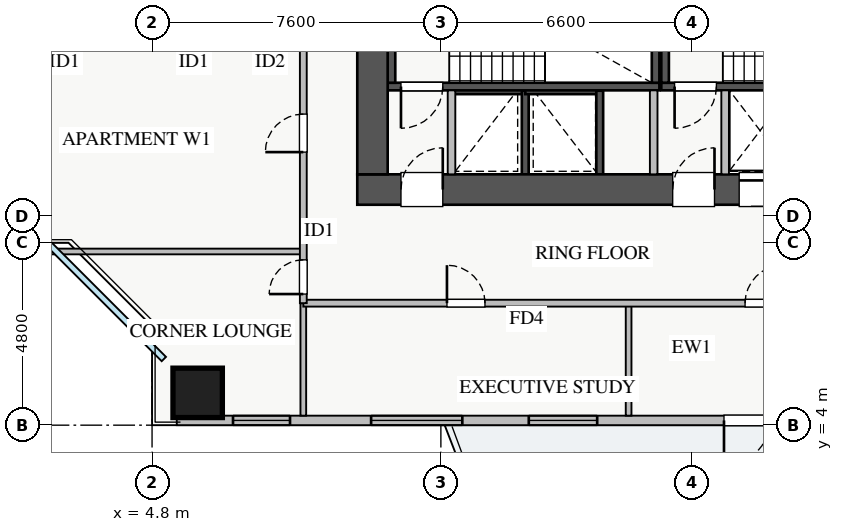
"""IFC4 building model, lengths in metres.
Left out: names, types, materials, properties, quantities, classifications, styles, units other than length and angle.
Written with IfcOpenShell. Run it as: python <this file> out.ifc"""

import sys

from ifc_helpers import new_model, si_unit, direction, frame, frame_2d, origin, origin_2d, place, context, subcontext, project, spatial, rectangle, extrude, source, transform, mapped, element, fill, save


model = new_model("IFC4")
c1 = context("Model", 3, precision=1e-05, world=origin(), true_north=direction((0.0, 1.0)))
c2 = subcontext(c1, "Body", "Model", "MODEL_VIEW")
j1 = project(units=[si_unit("LENGTHUNIT", "METRE"), si_unit("PLANEANGLEUNIT", "RADIAN")], contexts=[c1])
p1 = place(None, origin())
s1 = spatial("IfcSite", under=j1, at=p1, CompositionType="ELEMENT")
p2 = place(p1, origin())
s2 = spatial("IfcBuilding", under=s1, at=p2, CompositionType="ELEMENT")
p3 = place(p2, frame((0.0, 0.0, 26.25)))
s3 = spatial("IfcBuildingStorey", under=s2, at=p3, CompositionType="ELEMENT", Elevation=26.25)
p4 = place(p3, frame((12.68, 12.8, 0.0), z_axis=(0.0, 0.0, 1.0), x_axis=(1.0, 0.0, 0.0)))
e1 = element("IfcWall", 1, at=p4, inside=s3, PredefinedType="SHEAR", context=c2, shape_type="SweptSolid", body=[
    extrude(rectangle(XDim=1.94, YDim=0.18, at=frame_2d((0.97, 0.0))), origin(), (0.0, 0.0, 1.0), 3.07),
])
p5 = place(p3, frame((14.62, 10.6, 0.0), z_axis=(0.0, 0.0, 1.0), x_axis=(0.0, 1.0, 0.0)))
e2 = element("IfcWall", 2, at=p5, inside=s3, PredefinedType="SHEAR", context=c2, shape_type="SweptSolid", body=[
    extrude(rectangle(XDim=2.2, YDim=0.18, at=frame_2d((1.1, 0.0))), origin(), (0.0, 0.0, 1.0), 3.07),
])
p6 = place(p3, frame((14.62, 12.8, 0.0), z_axis=(0.0, 0.0, 1.0), x_axis=(1.0, 0.0, 0.0)))
e3 = element("IfcWall", 3, at=p6, inside=s3, PredefinedType="SHEAR", context=c2, shape_type="SweptSolid", body=[
    extrude(rectangle(XDim=1.96, YDim=0.18, at=frame_2d((0.98, 0.0))), origin(), (0.0, 0.0, 1.0), 3.07),
])
p7 = place(p3, frame((16.58, 10.6, 0.0), z_axis=(0.0, 0.0, 1.0), x_axis=(0.0, 1.0, 0.0)))
e4 = element("IfcWall", 4, at=p7, inside=s3, PredefinedType="SHEAR", context=c2, shape_type="SweptSolid", body=[
    extrude(rectangle(XDim=2.2, YDim=0.18, at=frame_2d((1.1, 0.0))), origin(), (0.0, 0.0, 1.0), 3.07),
])
p8 = place(p3, frame((19.88, 12.8, 0.0), z_axis=(0.0, 0.0, 1.0), x_axis=(1.0, 0.0, 0.0)))
e5 = element("IfcWall", 5, at=p8, inside=s3, PredefinedType="SHEAR", context=c2, shape_type="SweptSolid", body=[
    extrude(rectangle(XDim=1.87, YDim=0.18, at=frame_2d((0.935, 0.0))), origin(), (0.0, 0.0, 1.0), 3.07),
])
p9 = place(p3, frame((11.0, 12.91, 0.0), z_axis=(0.0, 0.0, 1.0), x_axis=(1.0, 0.0, 0.0)))
e6 = element("IfcWall", 6, at=p9, inside=s3, PredefinedType="SHEAR", context=c2, shape_type="SweptSolid", body=[
    extrude(rectangle(XDim=7.15, YDim=0.2, at=frame_2d((3.575, 0.0))), origin(), (0.0, 0.0, 1.0), 3.25),
])
p10 = place(p9, frame((0.35, 0.0, 0.0)))
e7 = element("IfcOpeningElement", 7, at=p10, cuts=e6, PredefinedType="OPENING", context=c2, shape_type="SweptSolid", body=[
    extrude(rectangle(XDim=1.1, YDim=2.05, at=frame_2d((0.55, 1.025))), frame((0.0, 0.11, 0.0), z_axis=(0.0, -1.0, 0.0), x_axis=(1.0, 0.0, 0.0)), (0.0, 0.0, 1.0), 0.22),
])
for number, where, z_axis, x_axis in (
    (8, (11.1, 13.01, 0.0), (0.0, 0.0, 1.0), (0.0, 1.0, 0.0)),
    (9, (18.05, 13.01, 0.0), (0.0, 0.0, 1.0), (0.0, 1.0, 0.0)),
):
    element("IfcWall", number, at=place(p3, frame(where, z_axis=z_axis, x_axis=x_axis)), inside=s3, PredefinedType="SHEAR", context=c2, shape_type="SweptSolid", body=[
        extrude(rectangle(XDim=2.94, YDim=0.2, at=frame_2d((1.47, 0.0))), origin(), (0.0, 0.0, 1.0), 3.25),
    ])
p11 = place(p3, frame((18.2, 12.91, 0.0), z_axis=(0.0, 0.0, 1.0), x_axis=(1.0, 0.0, 0.0)))
e10 = element("IfcWall", 10, at=p11, inside=s3, PredefinedType="SHEAR", context=c2, shape_type="SweptSolid", body=[
    extrude(rectangle(XDim=7.15, YDim=0.2, at=frame_2d((3.575, 0.0))), origin(), (0.0, 0.0, 1.0), 3.25),
])
p12 = place(p11, frame((0.35, 0.0, 0.0)))
e11 = element("IfcOpeningElement", 11, at=p12, cuts=e10, PredefinedType="OPENING", context=c2, shape_type="SweptSolid", body=[
    extrude(rectangle(XDim=1.1, YDim=2.05, at=frame_2d((0.55, 1.025))), frame((0.0, 0.11, 0.0), z_axis=(0.0, -1.0, 0.0), x_axis=(1.0, 0.0, 0.0)), (0.0, 0.0, 1.0), 0.22),
])
p13 = place(p3, frame((18.3, 13.01, 0.0), z_axis=(0.0, 0.0, 1.0), x_axis=(0.0, 1.0, 0.0)))
e12 = element("IfcWall", 12, at=p13, inside=s3, PredefinedType="SHEAR", context=c2, shape_type="SweptSolid", body=[
    extrude(rectangle(XDim=2.94, YDim=0.2, at=frame_2d((1.47, 0.0))), origin(), (0.0, 0.0, 1.0), 3.25),
])
p14 = place(p3, frame((10.2, 10.2, 0.0), z_axis=(0.0, 0.0, 1.0), x_axis=(1.0, 0.0, 0.0)))
e13 = element("IfcWall", 13, at=p14, inside=s3, PredefinedType="SHEAR", context=c2, shape_type="SweptSolid", body=[
    extrude(rectangle(XDim=17.6, YDim=0.8, at=frame_2d((8.8, 0.0))), origin(), (0.0, 0.0, 1.0), 3.25),
])
p15 = place(p14, frame((1.15, 0.0, 0.0)))
e14 = element("IfcOpeningElement", 14, at=p15, cuts=e13, PredefinedType="OPENING", context=c2, shape_type="SweptSolid", body=[
    extrude(rectangle(XDim=1.1, YDim=2.05, at=frame_2d((0.55, 1.025))), frame((0.0, 0.41, 0.0), z_axis=(0.0, -1.0, 0.0), x_axis=(1.0, 0.0, 0.0)), (0.0, 0.0, 1.0), 0.82),
])
p16 = place(p14, frame((8.3, 0.0, 0.0)))
e15 = element("IfcOpeningElement", 15, at=p16, cuts=e13, PredefinedType="OPENING", context=c2, shape_type="SweptSolid", body=[
    extrude(rectangle(XDim=1.1, YDim=2.05, at=frame_2d((0.55, 1.025))), frame((0.0, 0.41, 0.0), z_axis=(0.0, -1.0, 0.0), x_axis=(1.0, 0.0, 0.0)), (0.0, 0.0, 1.0), 0.82),
])
p17 = place(p14, frame((10.05, 0.0, 0.0)))
e16 = element("IfcOpeningElement", 16, at=p17, cuts=e13, PredefinedType="OPENING", context=c2, shape_type="SweptSolid", body=[
    extrude(rectangle(XDim=1.1, YDim=2.05, at=frame_2d((0.55, 1.025))), frame((0.0, 0.41, 0.0), z_axis=(0.0, -1.0, 0.0), x_axis=(1.0, 0.0, 0.0)), (0.0, 0.0, 1.0), 0.82),
])
p18 = place(p14, frame((14.74, 0.0, 0.0)))
e17 = element("IfcOpeningElement", 17, at=p18, cuts=e13, PredefinedType="OPENING", context=c2, shape_type="SweptSolid", body=[
    extrude(rectangle(XDim=1.0, YDim=2.05, at=frame_2d((0.5, 1.025))), frame((0.0, 0.41, 0.0), z_axis=(0.0, -1.0, 0.0), x_axis=(1.0, 0.0, 0.0)), (0.0, 0.0, 1.0), 0.82),
])
p19 = place(p14, frame((11.945, 0.0, 0.0)))
e18 = element("IfcOpeningElement", 18, at=p19, cuts=e13, PredefinedType="OPENING", context=c2, shape_type="SweptSolid", body=[
    extrude(rectangle(XDim=1.0, YDim=2.05, at=frame_2d((0.5, 1.025))), frame((0.0, 0.41, 0.0), z_axis=(0.0, -1.0, 0.0), x_axis=(1.0, 0.0, 0.0)), (0.0, 0.0, 1.0), 0.82),
])
p20 = place(p14, frame((13.48, 0.0, 0.0)))
e19 = element("IfcOpeningElement", 19, at=p20, cuts=e13, PredefinedType="OPENING", context=c2, shape_type="SweptSolid", body=[
    extrude(rectangle(XDim=1.0, YDim=2.05, at=frame_2d((0.5, 1.025))), frame((0.0, 0.41, 0.0), z_axis=(0.0, -1.0, 0.0), x_axis=(1.0, 0.0, 0.0)), (0.0, 0.0, 1.0), 0.82),
])
p21 = place(p3, frame((10.6, 10.6, 0.0), z_axis=(0.0, 0.0, 1.0), x_axis=(0.0, 1.0, 0.0)))
e20 = element("IfcWall", 20, at=p21, inside=s3, PredefinedType="SHEAR", context=c2, shape_type="SweptSolid", body=[
    extrude(rectangle(XDim=5.6, YDim=0.8, at=frame_2d((2.8, 0.0))), origin(), (0.0, 0.0, 1.0), 3.25),
])
m1 = source(origin(), c2, "Body", "SweptSolid", [
    extrude(rectangle(XDim=1.3, YDim=1.3, at=origin_2d()), origin(), (0.0, 0.0, 1.0), 3.25),
])
p22 = place(p3, frame((6.0, 4.85, 0.0), z_axis=(0.0, 0.0, 1.0), x_axis=(1.0, 0.0, 0.0)))
e21 = element("IfcColumn", 21, at=p22, inside=s3, PredefinedType="COLUMN", context=c2, shape_type="MappedRepresentation", body=[
    mapped(m1, transform((0.0, 0.0, 0.0), x_axis=(1.0, 0.0, 0.0), y_axis=(0.0, 1.0, 0.0), z_axis=(0.0, 0.0, 1.0), scale=1.0)),
])
p23 = place(p3, frame((5.45, 4.125, 0.0), z_axis=(0.0, 0.0, 1.0), x_axis=(1.0, 0.0, 0.0)))
e22 = element("IfcWall", 22, at=p23, inside=s3, PredefinedType="STANDARD", context=c2, shape_type="SweptSolid", body=[
    extrude(rectangle(XDim=27.1, YDim=0.25, at=frame_2d((13.55, 0.0))), origin(), (0.0, 0.0, 1.0), 2.61),
])
p24 = place(p23, frame((14.4, 0.0, 0.0)))
e23 = element("IfcOpeningElement", 23, at=p24, cuts=e22, PredefinedType="OPENING", context=c2, shape_type="SweptSolid", body=[
    extrude(rectangle(XDim=1.2, YDim=2.1, at=frame_2d((0.6, 1.05))), frame((0.0, 0.135, 0.0), z_axis=(0.0, -1.0, 0.0), x_axis=(1.0, 0.0, 0.0)), (0.0, 0.0, 1.0), 0.27),
])
p25 = place(p23, frame((1.48, 0.0, 0.9)))
e24 = element("IfcOpeningElement", 24, at=p25, cuts=e22, PredefinedType="OPENING", context=c2, shape_type="SweptSolid", body=[
    extrude(rectangle(XDim=1.5, YDim=1.5, at=frame_2d((0.75, 0.75))), frame((0.0, 0.135, 0.0), z_axis=(0.0, -1.0, 0.0), x_axis=(1.0, 0.0, 0.0)), (0.0, 0.0, 1.0), 0.27),
])
p26 = place(p23, frame((9.263, 0.0, 0.9)))
e25 = element("IfcOpeningElement", 25, at=p26, cuts=e22, PredefinedType="OPENING", context=c2, shape_type="SweptSolid", body=[
    extrude(rectangle(XDim=1.8, YDim=1.45, at=frame_2d((0.9, 0.725))), frame((0.0, 0.135, 0.0), z_axis=(0.0, -1.0, 0.0), x_axis=(1.0, 0.0, 0.0)), (0.0, 0.0, 1.0), 0.27),
])
p27 = place(p23, frame((16.188, 0.0, 0.9)))
e26 = element("IfcOpeningElement", 26, at=p27, cuts=e22, PredefinedType="OPENING", context=c2, shape_type="SweptSolid", body=[
    extrude(rectangle(XDim=1.5, YDim=1.45, at=frame_2d((0.75, 0.725))), frame((0.0, 0.135, 0.0), z_axis=(0.0, -1.0, 0.0), x_axis=(1.0, 0.0, 0.0)), (0.0, 0.0, 1.0), 0.27),
])
p28 = place(p23, frame((22.663, 0.0, 0.9)))
e27 = element("IfcOpeningElement", 27, at=p28, cuts=e22, PredefinedType="OPENING", context=c2, shape_type="SweptSolid", body=[
    extrude(rectangle(XDim=2.1, YDim=1.48, at=frame_2d((1.05, 0.74))), frame((0.0, 0.135, 0.0), z_axis=(0.0, -1.0, 0.0), x_axis=(1.0, 0.0, 0.0)), (0.0, 0.0, 1.0), 0.27),
])
p29 = place(p23, frame((5.114, 0.0, 0.9)))
e28 = element("IfcOpeningElement", 28, at=p29, cuts=e22, PredefinedType="OPENING", context=c2, shape_type="SweptSolid", body=[
    extrude(rectangle(XDim=2.4, YDim=1.5, at=frame_2d((1.2, 0.75))), frame((0.0, 0.135, 0.0), z_axis=(0.0, -1.0, 0.0), x_axis=(1.0, 0.0, 0.0)), (0.0, 0.0, 1.0), 0.27),
])
for number, where, z_axis, x_axis in (
    (29, (12.68, 10.6, 0.0), (0.0, 0.0, 1.0), (0.0, 1.0, 0.0)),
    (30, (18.0, 10.6, 0.0), (0.0, 0.0, 1.0), (0.0, 1.0, 0.0)),
    (31, (19.88, 10.6, 0.0), (0.0, 0.0, 1.0), (0.0, 1.0, 0.0)),
):
    element("IfcWall", number, at=place(p3, frame(where, z_axis=z_axis, x_axis=x_axis)), inside=s3, PredefinedType="PARTITIONING", context=c2, shape_type="SweptSolid", body=[
        extrude(rectangle(XDim=2.21, YDim=0.2, at=frame_2d((1.105, 0.0))), origin(), (0.0, 0.0, 1.0), 3.07),
    ])
for number, where, z_axis, x_axis in (
    (32, (17.34, 4.25, 0.0), (0.0, 0.0, 1.0), (0.0, 1.0, 0.0)),
    (33, (8.78, 4.25, 0.0), (0.0, 0.0, 1.0), (0.0, 1.0, 0.0)),
):
    element("IfcWall", number, at=place(p3, frame(where, z_axis=z_axis, x_axis=x_axis)), inside=s3, PredefinedType="PARTITIONING", context=c2, shape_type="SweptSolid", body=[
        extrude(rectangle(XDim=2.96, YDim=0.15, at=frame_2d((1.48, 0.0))), origin(), (0.0, 0.0, 1.0), 3.07),
    ])
p30 = place(p3, frame((8.78, 7.21, 0.0), z_axis=(0.0, 0.0, 1.0), x_axis=(1.0, 0.0, 0.0)))
e34 = element("IfcWall", 34, at=p30, inside=s3, PredefinedType="PARTITIONING", context=c2, shape_type="SweptSolid", body=[
    extrude(rectangle(XDim=23.54, YDim=0.18, at=frame_2d((11.77, 0.0))), origin(), (0.0, 0.0, 1.0), 3.07),
])
p31 = place(p30, frame((3.78, 0.0, 0.0)))
e35 = element("IfcOpeningElement", 35, at=p31, cuts=e34, PredefinedType="OPENING", context=c2, shape_type="SweptSolid", body=[
    extrude(rectangle(XDim=1.0, YDim=2.05, at=frame_2d((0.5, 1.025))), frame((0.0, 0.1, 0.0), z_axis=(0.0, -1.0, 0.0), x_axis=(1.0, 0.0, 0.0)), (0.0, 0.0, 1.0), 0.2),
])
p32 = place(p30, frame((11.625, 0.0, 0.0)))
e36 = element("IfcOpeningElement", 36, at=p32, cuts=e34, PredefinedType="OPENING", context=c2, shape_type="SweptSolid", body=[
    extrude(rectangle(XDim=1.0, YDim=2.05, at=frame_2d((0.5, 1.025))), frame((0.0, 0.1, 0.0), z_axis=(0.0, -1.0, 0.0), x_axis=(1.0, 0.0, 0.0)), (0.0, 0.0, 1.0), 0.2),
])
p33 = place(p30, frame((19.115, 0.0, 0.0)))
e37 = element("IfcOpeningElement", 37, at=p33, cuts=e34, PredefinedType="OPENING", context=c2, shape_type="SweptSolid", body=[
    extrude(rectangle(XDim=1.0, YDim=2.05, at=frame_2d((0.5, 1.025))), frame((0.0, 0.1, 0.0), z_axis=(0.0, -1.0, 0.0), x_axis=(1.0, 0.0, 0.0)), (0.0, 0.0, 1.0), 0.2),
])
p34 = place(p3, frame((0.25, 8.57, 0.0), z_axis=(0.0, 0.0, 1.0), x_axis=(1.0, 0.0, 0.0)))
e38 = element("IfcWall", 38, at=p34, inside=s3, PredefinedType="PARTITIONING", context=c2, shape_type="SweptSolid", body=[
    extrude(rectangle(XDim=8.53, YDim=0.15, at=frame_2d((4.265, 0.0))), origin(), (0.0, 0.0, 1.0), 3.07),
])
p35 = place(p3, frame((8.78, 7.21, 0.0), z_axis=(0.0, 0.0, 1.0), x_axis=(0.0, 1.0, 0.0)))
e39 = element("IfcWall", 39, at=p35, inside=s3, PredefinedType="PARTITIONING", context=c2, shape_type="SweptSolid", body=[
    extrude(rectangle(XDim=31.23, YDim=0.18, at=frame_2d((15.615, 0.0))), origin(), (0.0, 0.0, 1.0), 3.07),
])
p36 = place(p35, frame((30.09, 0.0, 0.0)))
e40 = element("IfcOpeningElement", 40, at=p36, cuts=e39, PredefinedType="OPENING", context=c2, shape_type="SweptSolid", body=[
    extrude(rectangle(XDim=0.9, YDim=2.05, at=frame_2d((0.45, 1.025))), frame((0.0, 0.1, 0.0), z_axis=(0.0, -1.0, 0.0), x_axis=(1.0, 0.0, 0.0)), (0.0, 0.0, 1.0), 0.2),
])
p37 = place(p35, frame((0.24, 0.0, 0.0)))
e41 = element("IfcOpeningElement", 41, at=p37, cuts=e39, PredefinedType="OPENING", context=c2, shape_type="SweptSolid", body=[
    extrude(rectangle(XDim=0.9, YDim=2.05, at=frame_2d((0.45, 1.025))), frame((0.0, 0.1, 0.0), z_axis=(0.0, -1.0, 0.0), x_axis=(1.0, 0.0, 0.0)), (0.0, 0.0, 1.0), 0.2),
])
p38 = place(p35, frame((3.975, 0.0, 0.0)))
e42 = element("IfcOpeningElement", 42, at=p38, cuts=e39, PredefinedType="OPENING", context=c2, shape_type="SweptSolid", body=[
    extrude(rectangle(XDim=1.0, YDim=2.05, at=frame_2d((0.5, 1.025))), frame((0.0, 0.1, 0.0), z_axis=(0.0, -1.0, 0.0), x_axis=(1.0, 0.0, 0.0)), (0.0, 0.0, 1.0), 0.2),
])
p39 = place(p35, frame((22.0, 0.0, 0.0)))
e43 = element("IfcOpeningElement", 43, at=p39, cuts=e39, PredefinedType="OPENING", context=c2, shape_type="SweptSolid", body=[
    extrude(rectangle(XDim=1.0, YDim=2.05, at=frame_2d((0.5, 1.025))), frame((0.0, 0.1, 0.0), z_axis=(0.0, -1.0, 0.0), x_axis=(1.0, 0.0, 0.0)), (0.0, 0.0, 1.0), 0.2),
])
m2 = source(origin(), c2, "Body", "SweptSolid", [
    extrude(rectangle(XDim=1.2, YDim=2.1, at=frame_2d((0.6, 1.05))), frame((0.0, 0.025, 0.0), z_axis=(0.0, -1.0, 0.0), x_axis=(1.0, 0.0, 0.0)), (0.0, 0.0, 1.0), 0.05),
])
p40 = place(p24, frame((1.2, 0.0, 0.0), z_axis=(0.0, 0.0, 1.0), x_axis=(-1.0, 0.0, 0.0)))
e44 = element("IfcDoor", 44, at=p40, inside=s3, OperationType="SINGLE_SWING_LEFT", PredefinedType="DOOR", context=c2, shape_type="MappedRepresentation", body=[
    mapped(m2, transform((0.0, 0.0, 0.0), x_axis=(1.0, 0.0, 0.0), y_axis=(0.0, 1.0, 0.0), z_axis=(0.0, 0.0, 1.0), scale=1.0)),
])
fill(e23, e44)
m3 = source(origin(), c2, "Body", "SweptSolid", [
    extrude(rectangle(XDim=1.5, YDim=1.5, at=frame_2d((0.75, 0.75))), frame((0.0, 0.03, 0.0), z_axis=(0.0, -1.0, 0.0), x_axis=(1.0, 0.0, 0.0)), (0.0, 0.0, 1.0), 0.06),
])
p41 = place(p25, origin())
e45 = element("IfcWindow", 45, at=p41, inside=s3, PartitioningType="TRIPLE_PANEL_VERTICAL", PredefinedType="WINDOW", context=c2, shape_type="MappedRepresentation", body=[
    mapped(m3, transform((0.0, 0.0, 0.0), x_axis=(1.0, 0.0, 0.0), y_axis=(0.0, 1.0, 0.0), z_axis=(0.0, 0.0, 1.0), scale=1.0)),
])
fill(e24, e45)
m4 = source(origin(), c2, "Body", "SweptSolid", [
    extrude(rectangle(XDim=1.8, YDim=1.45, at=frame_2d((0.9, 0.725))), frame((0.0, 0.03, 0.0), z_axis=(0.0, -1.0, 0.0), x_axis=(1.0, 0.0, 0.0)), (0.0, 0.0, 1.0), 0.06),
])
p42 = place(p26, origin())
e46 = element("IfcWindow", 46, at=p42, inside=s3, PartitioningType="DOUBLE_PANEL_VERTICAL", PredefinedType="WINDOW", context=c2, shape_type="MappedRepresentation", body=[
    mapped(m4, transform((0.0, 0.0, 0.0), x_axis=(1.0, 0.0, 0.0), y_axis=(0.0, 1.0, 0.0), z_axis=(0.0, 0.0, 1.0), scale=1.0)),
])
fill(e25, e46)
m5 = source(origin(), c2, "Body", "SweptSolid", [
    extrude(rectangle(XDim=1.1, YDim=2.05, at=frame_2d((0.55, 1.025))), frame((0.0, 0.025, 0.0), z_axis=(0.0, -1.0, 0.0), x_axis=(1.0, 0.0, 0.0)), (0.0, 0.0, 1.0), 0.05),
])
p43 = place(p15, origin())
e47 = element("IfcDoor", 47, at=p43, inside=s3, OperationType="SINGLE_SWING_RIGHT", PredefinedType="DOOR", context=c2, shape_type="MappedRepresentation", body=[
    mapped(m5, transform((0.0, 0.0, 0.0), x_axis=(1.0, 0.0, 0.0), y_axis=(0.0, 1.0, 0.0), z_axis=(0.0, 0.0, 1.0), scale=1.0)),
])
fill(e14, e47)
p44 = place(p10, frame((1.1, 0.0, 0.0), z_axis=(0.0, 0.0, 1.0), x_axis=(-1.0, 0.0, 0.0)))
e48 = element("IfcDoor", 48, at=p44, inside=s3, OperationType="SINGLE_SWING_LEFT", PredefinedType="DOOR", context=c2, shape_type="MappedRepresentation", body=[
    mapped(m5, transform((0.0, 0.0, 0.0), x_axis=(1.0, 0.0, 0.0), y_axis=(0.0, 1.0, 0.0), z_axis=(0.0, 0.0, 1.0), scale=1.0)),
])
fill(e7, e48)
p45 = place(p16, origin())
e49 = element("IfcDoor", 49, at=p45, inside=s3, OperationType="SINGLE_SWING_RIGHT", PredefinedType="DOOR", context=c2, shape_type="MappedRepresentation", body=[
    mapped(m5, transform((0.0, 0.0, 0.0), x_axis=(1.0, 0.0, 0.0), y_axis=(0.0, 1.0, 0.0), z_axis=(0.0, 0.0, 1.0), scale=1.0)),
])
fill(e15, e49)
p46 = place(p12, frame((1.1, 0.0, 0.0), z_axis=(0.0, 0.0, 1.0), x_axis=(-1.0, 0.0, 0.0)))
e50 = element("IfcDoor", 50, at=p46, inside=s3, OperationType="SINGLE_SWING_LEFT", PredefinedType="DOOR", context=c2, shape_type="MappedRepresentation", body=[
    mapped(m5, transform((0.0, 0.0, 0.0), x_axis=(1.0, 0.0, 0.0), y_axis=(0.0, 1.0, 0.0), z_axis=(0.0, 0.0, 1.0), scale=1.0)),
])
fill(e11, e50)
p47 = place(p17, origin())
e51 = element("IfcDoor", 51, at=p47, inside=s3, OperationType="SLIDING_TO_RIGHT", PredefinedType="DOOR", context=c2, shape_type="MappedRepresentation", body=[
    mapped(m5, transform((0.0, 0.0, 0.0), x_axis=(1.0, 0.0, 0.0), y_axis=(0.0, 1.0, 0.0), z_axis=(0.0, 0.0, 1.0), scale=1.0)),
])
fill(e16, e51)
m6 = source(origin(), c2, "Body", "SweptSolid", [
    extrude(rectangle(XDim=1.0, YDim=2.05, at=frame_2d((0.5, 1.025))), frame((0.0, 0.025, 0.0), z_axis=(0.0, -1.0, 0.0), x_axis=(1.0, 0.0, 0.0)), (0.0, 0.0, 1.0), 0.05),
])
p48 = place(p31, origin())
e52 = element("IfcDoor", 52, at=p48, inside=s3, OperationType="SINGLE_SWING_LEFT", PredefinedType="DOOR", context=c2, shape_type="MappedRepresentation", body=[
    mapped(m6, transform((0.0, 0.0, 0.0), x_axis=(1.0, 0.0, 0.0), y_axis=(0.0, 1.0, 0.0), z_axis=(0.0, 0.0, 1.0), scale=1.0)),
])
fill(e35, e52)
p49 = place(p32, origin())
e53 = element("IfcDoor", 53, at=p49, inside=s3, OperationType="SINGLE_SWING_RIGHT", PredefinedType="DOOR", context=c2, shape_type="MappedRepresentation", body=[
    mapped(m6, transform((0.0, 0.0, 0.0), x_axis=(1.0, 0.0, 0.0), y_axis=(0.0, 1.0, 0.0), z_axis=(0.0, 0.0, 1.0), scale=1.0)),
])
fill(e36, e53)
m7 = source(origin(), c2, "Body", "SweptSolid", [
    extrude(rectangle(XDim=0.9, YDim=2.05, at=frame_2d((0.45, 1.025))), frame((0.0, 0.025, 0.0), z_axis=(0.0, -1.0, 0.0), x_axis=(1.0, 0.0, 0.0)), (0.0, 0.0, 1.0), 0.05),
])
p50 = place(p37, origin())
e54 = element("IfcDoor", 54, at=p50, inside=s3, OperationType="SINGLE_SWING_LEFT", PredefinedType="DOOR", context=c2, shape_type="MappedRepresentation", body=[
    mapped(m7, transform((0.0, 0.0, 0.0), x_axis=(1.0, 0.0, 0.0), y_axis=(0.0, 1.0, 0.0), z_axis=(0.0, 0.0, 1.0), scale=1.0)),
])
fill(e41, e54)
p51 = place(p38, origin())
e55 = element("IfcDoor", 55, at=p51, inside=s3, OperationType="SINGLE_SWING_LEFT", PredefinedType="DOOR", context=c2, shape_type="MappedRepresentation", body=[
    mapped(m6, transform((0.0, 0.0, 0.0), x_axis=(1.0, 0.0, 0.0), y_axis=(0.0, 1.0, 0.0), z_axis=(0.0, 0.0, 1.0), scale=1.0)),
])
fill(e42, e55)
m8 = source(origin(), c2, "Body", "SweptSolid", [
    extrude(rectangle(XDim=2.4, YDim=1.5, at=frame_2d((1.2, 0.75))), frame((0.0, 0.03, 0.0), z_axis=(0.0, -1.0, 0.0), x_axis=(1.0, 0.0, 0.0)), (0.0, 0.0, 1.0), 0.06),
])
p52 = place(p29, origin())
e56 = element("IfcWindow", 56, at=p52, inside=s3, PartitioningType="TRIPLE_PANEL_VERTICAL", PredefinedType="WINDOW", context=c2, shape_type="MappedRepresentation", body=[
    mapped(m8, transform((0.0, 0.0, 0.0), x_axis=(1.0, 0.0, 0.0), y_axis=(0.0, 1.0, 0.0), z_axis=(0.0, 0.0, 1.0), scale=1.0)),
])
fill(e28, e56)
save(model, sys.argv[1])
